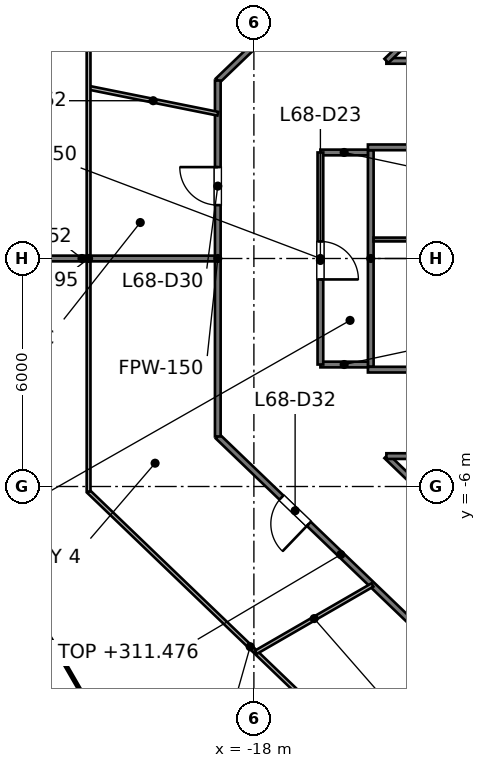
"""IFC4 building model, lengths in metres.
Left out: names, types, materials, properties, quantities, classifications, styles, units other than length and angle.
Written with IfcOpenShell. Run it as: python <this file> out.ifc"""

import sys

from ifc_helpers import new_model, si_unit, direction, frame, frame_2d, origin, place, context, subcontext, project, spatial, rectangle, extrude, element, fill, save


model = new_model("IFC4")
c1 = context("Model", 3, precision=1e-05, world=origin(), true_north=direction((0.0, 1.0)))
c2 = subcontext(c1, "Body", "Model", "MODEL_VIEW")
j1 = project(units=[si_unit("LENGTHUNIT", "METRE"), si_unit("PLANEANGLEUNIT", "RADIAN")], contexts=[c1])
p1 = place(None, origin())
s1 = spatial("IfcSite", under=j1, at=p1, CompositionType="ELEMENT")
p2 = place(p1, origin())
s2 = spatial("IfcBuilding", under=s1, at=p2, CompositionType="ELEMENT")
p3 = place(p2, frame((0.0, 0.0, 308.4)))
s3 = spatial("IfcBuildingStorey", under=s2, at=p3, CompositionType="ELEMENT", Elevation=308.4)
p4 = place(p3, frame((-14.925, -2.85, 0.0), z_axis=(0.0, 0.0, 1.0), x_axis=(0.0, 1.0, 0.0)))
e1 = element("IfcWall", 1, at=p4, inside=s3, PredefinedType="PARTITIONING", context=c2, shape_type="SweptSolid", body=[
    extrude(rectangle(XDim=5.7, YDim=0.15, at=frame_2d((2.85, 0.0))), origin(), (0.0, 0.0, 1.0), 2.995),
])
for number, where, z_axis, x_axis in (
    (2, (-15.0, 2.925, 0.0), (0.0, 0.0, 1.0), (1.0, 0.0, 0.0)),
    (3, (-15.0, -2.925, 0.0), (0.0, 0.0, 1.0), (1.0, 0.0, 0.0)),
):
    element("IfcWall", number, at=place(p3, frame(where, z_axis=z_axis, x_axis=x_axis)), inside=s3, PredefinedType="PARTITIONING", context=c2, shape_type="SweptSolid", body=[
        extrude(rectangle(XDim=3.0, YDim=0.15, at=frame_2d((1.5, 0.0))), origin(), (0.0, 0.0, 1.0), 3.152),
    ])
p5 = place(p3, frame((-14.85, 0.5, 0.0), z_axis=(0.0, 0.0, 1.0), x_axis=(1.0, 0.0, 0.0)))
e4 = element("IfcWall", 4, at=p5, inside=s3, PredefinedType="PARTITIONING", context=c2, shape_type="SweptSolid", body=[
    extrude(rectangle(XDim=2.85, YDim=0.1, at=frame_2d((1.425, 0.0))), origin(), (0.0, 0.0, 1.0), 3.85),
])
p6 = place(p3, frame((-18.95, -4.683, 0.0), z_axis=(0.0, 0.0, 1.0), x_axis=(0.721259541977, -0.692664906797, 0.0)))
e5 = element("IfcWall", 5, at=p6, inside=s3, PredefinedType="PARTITIONING", context=c2, shape_type="SweptSolid", body=[
    extrude(rectangle(XDim=8.973, YDim=0.15, at=frame_2d((4.487, 0.0))), origin(), (0.0, 0.0, 1.0), 3.076),
])
p7 = place(p6, frame((2.321, 0.0, 0.0)))
e6 = element("IfcOpeningElement", 6, at=p7, cuts=e5, PredefinedType="OPENING", context=c2, shape_type="SweptSolid", body=[
    extrude(rectangle(XDim=1.0, YDim=2.1, at=frame_2d((0.5, 1.05))), frame((0.0, 0.075, 0.0), z_axis=(0.0, -1.0, 0.0), x_axis=(1.0, 0.0, 0.0)), (0.0, 0.0, 1.0), 0.15),
])
p8 = place(p3, frame((-14.514, -5.2, 0.0), z_axis=(0.0, 0.0, 1.0), x_axis=(0.721228427004, -0.692697304803, 0.0)))
e7 = element("IfcWall", 7, at=p8, inside=s3, PredefinedType="PARTITIONING", context=c2, shape_type="SweptSolid", body=[
    extrude(rectangle(XDim=4.33, YDim=0.15, at=frame_2d((2.165, 0.0))), origin(), (0.0, 0.0, 1.0), 3.076),
])
p9 = place(p3, frame((-14.514, -5.2, 0.0), z_axis=(0.0, 0.0, 1.0), x_axis=(1.0, 0.0, 0.0)))
e8 = element("IfcWall", 8, at=p9, inside=s3, PredefinedType="PARTITIONING", context=c2, shape_type="SweptSolid", body=[
    extrude(rectangle(XDim=2.514, YDim=0.15, at=frame_2d((1.257, 0.0))), origin(), (0.0, 0.0, 1.0), 3.85),
])
p10 = place(p3, frame((-16.25, -2.79, 0.0), z_axis=(0.0, 0.0, 1.0), x_axis=(1.0, 0.0, 0.0)))
e9 = element("IfcWall", 9, at=p10, inside=s3, PredefinedType="PARTITIONING", context=c2, shape_type="SweptSolid", body=[
    extrude(rectangle(XDim=1.25, YDim=0.15, at=frame_2d((0.625, 0.0))), origin(), (0.0, 0.0, 1.0), 3.85),
])
p11 = place(p3, frame((-26.098, 0.0, 0.0), z_axis=(0.0, 0.0, 1.0), x_axis=(1.0, 0.0, 0.0)))
e10 = element("IfcWall", 10, at=p11, inside=s3, PredefinedType="PARTITIONING", context=c2, shape_type="SweptSolid", body=[
    extrude(rectangle(XDim=7.148, YDim=0.15, at=frame_2d((3.574, 0.0))), origin(), (0.0, 0.0, 1.0), 3.152),
])
p12 = place(p3, frame((-16.25, 2.79, 0.0), z_axis=(0.0, 0.0, 1.0), x_axis=(1.0, 0.0, 0.0)))
e11 = element("IfcWall", 11, at=p12, inside=s3, PredefinedType="PARTITIONING", context=c2, shape_type="SweptSolid", body=[
    extrude(rectangle(XDim=1.25, YDim=0.15, at=frame_2d((0.625, 0.0))), origin(), (0.0, 0.0, 1.0), 3.85),
])
p13 = place(p3, frame((-14.514, 5.2, 0.0), z_axis=(0.0, 0.0, 1.0), x_axis=(1.0, 0.0, 0.0)))
e12 = element("IfcWall", 12, at=p13, inside=s3, PredefinedType="PARTITIONING", context=c2, shape_type="SweptSolid", body=[
    extrude(rectangle(XDim=2.514, YDim=0.15, at=frame_2d((1.257, 0.0))), origin(), (0.0, 0.0, 1.0), 3.85),
])
p14 = place(p3, frame((-14.514, 5.2, 0.0), z_axis=(0.0, 0.0, 1.0), x_axis=(0.721228427004, 0.692697304803, 0.0)))
e13 = element("IfcWall", 13, at=p14, inside=s3, PredefinedType="PARTITIONING", context=c2, shape_type="SweptSolid", body=[
    extrude(rectangle(XDim=4.33, YDim=0.15, at=frame_2d((2.165, 0.0))), origin(), (0.0, 0.0, 1.0), 3.076),
])
p15 = place(p3, frame((-18.95, 4.683, 0.0), z_axis=(0.0, 0.0, 1.0), x_axis=(0.721259541977, 0.692664906797, 0.0)))
e14 = element("IfcWall", 14, at=p15, inside=s3, PredefinedType="PARTITIONING", context=c2, shape_type="SweptSolid", body=[
    extrude(rectangle(XDim=8.973, YDim=0.15, at=frame_2d((4.487, 0.0))), origin(), (0.0, 0.0, 1.0), 3.076),
])
p16 = place(p15, frame((3.937, 0.0, 0.0)))
e15 = element("IfcOpeningElement", 15, at=p16, cuts=e14, PredefinedType="OPENING", context=c2, shape_type="SweptSolid", body=[
    extrude(rectangle(XDim=1.0, YDim=2.1, at=frame_2d((0.5, 1.05))), frame((0.0, 0.075, 0.0), z_axis=(0.0, -1.0, 0.0), x_axis=(1.0, 0.0, 0.0)), (0.0, 0.0, 1.0), 0.15),
])
p17 = place(p3, frame((-16.25, -2.79, 0.0), z_axis=(0.0, 0.0, 1.0), x_axis=(0.0, 1.0, 0.0)))
e16 = element("IfcWall", 16, at=p17, inside=s3, PredefinedType="PARTITIONING", context=c2, shape_type="SweptSolid", body=[
    extrude(rectangle(XDim=5.58, YDim=0.15, at=frame_2d((2.79, 0.0))), origin(), (0.0, 0.0, 1.0), 2.995),
])
p18 = place(p17, frame((2.239, 0.0, 0.0)))
e17 = element("IfcOpeningElement", 17, at=p18, cuts=e16, PredefinedType="OPENING", context=c2, shape_type="SweptSolid", body=[
    extrude(rectangle(XDim=1.0, YDim=2.1, at=frame_2d((0.5, 1.05))), frame((0.0, 0.075, 0.0), z_axis=(0.0, -1.0, 0.0), x_axis=(1.0, 0.0, 0.0)), (0.0, 0.0, 1.0), 0.15),
])
p19 = place(p3, frame((-18.95, -4.683, 0.0), z_axis=(0.0, 0.0, 1.0), x_axis=(0.0, 1.0, 0.0)))
e18 = element("IfcWall", 18, at=p19, inside=s3, PredefinedType="PARTITIONING", context=c2, shape_type="SweptSolid", body=[
    extrude(rectangle(XDim=9.366, YDim=0.15, at=frame_2d((4.683, 0.0))), origin(), (0.0, 0.0, 1.0), 2.995),
])
p20 = place(p19, frame((6.088, 0.0, 0.0)))
e19 = element("IfcOpeningElement", 19, at=p20, cuts=e18, PredefinedType="OPENING", context=c2, shape_type="SweptSolid", body=[
    extrude(rectangle(XDim=1.0, YDim=2.1, at=frame_2d((0.5, 1.05))), frame((0.0, 0.075, 0.0), z_axis=(0.0, -1.0, 0.0), x_axis=(1.0, 0.0, 0.0)), (0.0, 0.0, 1.0), 0.15),
])
p21 = place(p3, frame((-22.35, -6.132, 0.0), z_axis=(0.0, 0.0, 1.0), x_axis=(0.72117874289, -0.692749031615, 0.0)))
e20 = element("IfcWall", 20, at=p21, inside=s3, PredefinedType="PARTITIONING", context=c2, shape_type="SweptSolid", body=[
    extrude(rectangle(XDim=11.791, YDim=0.1, at=frame_2d((5.896, 0.0))), origin(), (0.0, 0.0, 1.0), 2.995),
])
p22 = place(p3, frame((-22.35, 4.494, 0.0), z_axis=(0.0, 0.0, 1.0), x_axis=(0.980368926978, -0.197171922486, 0.0)))
e21 = element("IfcWall", 21, at=p22, inside=s3, PredefinedType="PARTITIONING", context=c2, shape_type="SweptSolid", body=[
    extrude(rectangle(XDim=3.468, YDim=0.1, at=frame_2d((1.734, 0.0))), origin(), (0.0, 0.0, 1.0), 3.152),
])
p23 = place(p3, frame((-17.946, -10.361, 0.0), z_axis=(0.0, 0.0, 1.0), x_axis=(0.865967311171, 0.500100605862, 0.0)))
e22 = element("IfcWall", 22, at=p23, inside=s3, PredefinedType="PARTITIONING", context=c2, shape_type="SweptSolid", body=[
    extrude(rectangle(XDim=3.539, YDim=0.1, at=frame_2d((1.77, 0.0))), origin(), (0.0, 0.0, 1.0), 3.85),
])
p24 = place(p3, frame((-22.35, -6.132, 0.0), z_axis=(0.0, 0.0, 1.0), x_axis=(0.0, 1.0, 0.0)))
e23 = element("IfcWall", 23, at=p24, inside=s3, PredefinedType="PARTITIONING", context=c2, shape_type="SweptSolid", body=[
    extrude(rectangle(XDim=12.264, YDim=0.1, at=frame_2d((6.132, 0.0))), origin(), (0.0, 0.0, 1.0), 2.995),
])
p25 = place(p18, origin())
e24 = element("IfcDoor", 24, at=p25, inside=s3, OperationType="SINGLE_SWING_LEFT", PredefinedType="DOOR", context=c2, shape_type="SweptSolid", body=[
    extrude(rectangle(XDim=1.0, YDim=2.1, at=frame_2d((0.5, 1.05))), frame((0.0, 0.025, 0.0), z_axis=(0.0, -1.0, 0.0), x_axis=(1.0, 0.0, 0.0)), (0.0, 0.0, 1.0), 0.05),
])
fill(e17, e24)
p26 = place(p20, origin())
e25 = element("IfcDoor", 25, at=p26, inside=s3, OperationType="SINGLE_SWING_RIGHT", PredefinedType="DOOR", context=c2, shape_type="SweptSolid", body=[
    extrude(rectangle(XDim=1.0, YDim=2.1, at=frame_2d((0.5, 1.05))), frame((0.0, 0.025, 0.0), z_axis=(0.0, -1.0, 0.0), x_axis=(1.0, 0.0, 0.0)), (0.0, 0.0, 1.0), 0.05),
])
fill(e19, e25)
p27 = place(p7, origin())
e26 = element("IfcDoor", 26, at=p27, inside=s3, OperationType="SINGLE_SWING_RIGHT", PredefinedType="DOOR", context=c2, shape_type="SweptSolid", body=[
    extrude(rectangle(XDim=1.0, YDim=2.1, at=frame_2d((0.5, 1.05))), frame((0.0, 0.025, 0.0), z_axis=(0.0, -1.0, 0.0), x_axis=(1.0, 0.0, 0.0)), (0.0, 0.0, 1.0), 0.05),
])
fill(e6, e26)
save(model, sys.argv[1])
